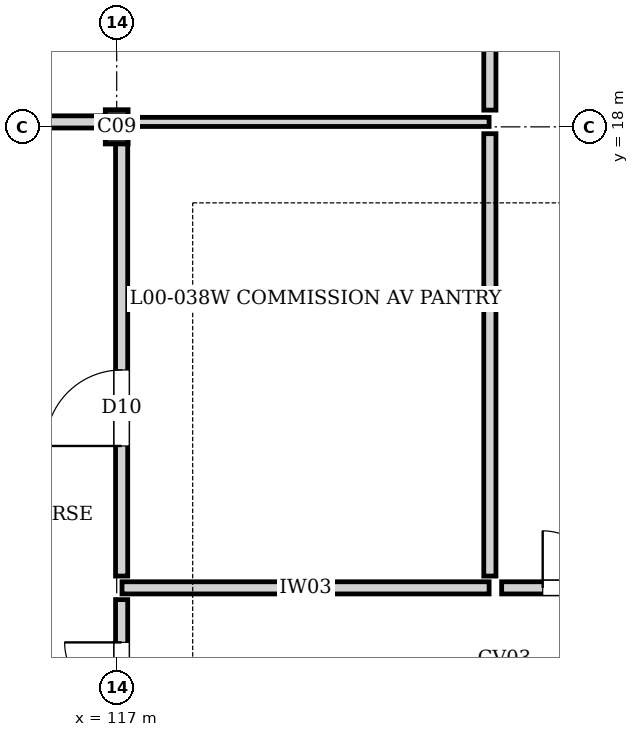
"""IFC4 building model, lengths in metres.
Left out: names, types, materials, properties, quantities, classifications, styles, units other than length and angle.
Written with IfcOpenShell. Run it as: python <this file> out.ifc"""

import sys

from ifc_helpers import new_model, si_unit, direction, frame, frame_2d, origin, origin_2d, place, context, subcontext, project, spatial, rectangle, i_section, extrude, element, fill, save


model = new_model("IFC4")
c1 = context("Model", 3, precision=1e-05, world=origin(), true_north=direction((0.0, 1.0)))
c2 = subcontext(c1, "Body", "Model", "MODEL_VIEW")
j1 = project(units=[si_unit("LENGTHUNIT", "METRE"), si_unit("PLANEANGLEUNIT", "RADIAN")], contexts=[c1])
p1 = place(None, origin())
s1 = spatial("IfcSite", under=j1, at=p1, CompositionType="ELEMENT")
p2 = place(p1, origin())
s2 = spatial("IfcBuilding", under=s1, at=p2, CompositionType="ELEMENT")
p3 = place(p2, origin())
s3 = spatial("IfcBuildingStorey", under=s2, at=p3, CompositionType="ELEMENT", Elevation=0.0)
p4 = place(p3, frame((117.0, 18.0, 0.0), z_axis=(0.0, 0.0, 1.0), x_axis=(1.0, 0.0, 0.0)))
e1 = element("IfcColumn", 1, at=p4, inside=s3, PredefinedType="COLUMN", context=c2, shape_type="SweptSolid", body=[
    extrude(i_section(OverallWidth=0.3, OverallDepth=0.45, WebThickness=0.014, FlangeThickness=0.026, at=origin_2d()), origin(), (0.0, 0.0, 1.0), 4.32),
])
p5 = place(p3, frame((108.145, 18.065, 0.0), z_axis=(0.0, 0.0, 1.0), x_axis=(1.0, 0.0, 0.0)))
e2 = element("IfcWall", 2, at=p5, inside=s3, PredefinedType="PARTITIONING", context=c2, shape_type="SweptSolid", body=[
    extrude(rectangle(XDim=8.915, YDim=0.16, at=frame_2d((4.458, 0.0))), origin(), (0.0, 0.0, 1.0), 3.695),
])
p6 = place(p3, frame((117.07, 11.935, 0.0), z_axis=(0.0, 0.0, 1.0), x_axis=(1.0, 0.0, 0.0)))
e3 = element("IfcWall", 3, at=p6, inside=s3, PredefinedType="PARTITIONING", context=c2, shape_type="SweptSolid", body=[
    extrude(rectangle(XDim=4.83, YDim=0.16, at=frame_2d((2.415, 0.0))), origin(), (0.0, 0.0, 1.0), 4.055),
])
p7 = place(p3, frame((117.07, 18.065, 0.0), z_axis=(0.0, 0.0, 1.0), x_axis=(1.0, 0.0, 0.0)))
e4 = element("IfcWall", 4, at=p7, inside=s3, PredefinedType="PARTITIONING", context=c2, shape_type="SweptSolid", body=[
    extrude(rectangle(XDim=4.83, YDim=0.12, at=frame_2d((2.415, 0.0))), origin(), (0.0, 0.0, 1.0), 3.655),
])
p8 = place(p3, frame((121.91, 12.09, 0.0), z_axis=(0.0, 0.0, 1.0), x_axis=(0.0, 1.0, 0.0)))
e5 = element("IfcWall", 5, at=p8, inside=s3, PredefinedType="PARTITIONING", context=c2, shape_type="SweptSolid", body=[
    extrude(rectangle(XDim=5.82, YDim=0.16, at=frame_2d((2.91, 0.0))), origin(), (0.0, 0.0, 1.0), 4.055),
])
p9 = place(p3, frame((117.065, 9.155, 0.0), z_axis=(0.0, 0.0, 1.0), x_axis=(0.0, 1.0, 0.0)))
e6 = element("IfcWall", 6, at=p9, inside=s3, PredefinedType="PARTITIONING", context=c2, shape_type="SweptSolid", body=[
    extrude(rectangle(XDim=2.625, YDim=0.16, at=frame_2d((1.312, 0.0))), origin(), (0.0, 0.0, 1.0), 3.665),
])
p10 = place(p9, frame((0.562, 0.0, 0.0)))
e7 = element("IfcOpeningElement", 7, at=p10, cuts=e6, PredefinedType="OPENING", context=c2, shape_type="SweptSolid", body=[
    extrude(rectangle(XDim=1.5, YDim=2.1, at=frame_2d((0.75, 1.05))), frame((0.0, 0.09, 0.0), z_axis=(0.0, -1.0, 0.0), x_axis=(1.0, 0.0, 0.0)), (0.0, 0.0, 1.0), 0.18),
])
p11 = place(p3, frame((117.065, 12.09, 0.0), z_axis=(0.0, 0.0, 1.0), x_axis=(0.0, 1.0, 0.0)))
e8 = element("IfcWall", 8, at=p11, inside=s3, PredefinedType="PARTITIONING", context=c2, shape_type="SweptSolid", body=[
    extrude(rectangle(XDim=5.82, YDim=0.16, at=frame_2d((2.91, 0.0))), origin(), (0.0, 0.0, 1.0), 3.665),
])
p12 = place(p11, frame((1.712, 0.0, 0.0)))
e9 = element("IfcOpeningElement", 9, at=p12, cuts=e8, PredefinedType="OPENING", context=c2, shape_type="SweptSolid", body=[
    extrude(rectangle(XDim=1.0, YDim=2.1, at=frame_2d((0.5, 1.05))), frame((0.0, 0.09, 0.0), z_axis=(0.0, -1.0, 0.0), x_axis=(1.0, 0.0, 0.0)), (0.0, 0.0, 1.0), 0.18),
])
p13 = place(p3, frame((122.065, 11.935, 0.0), z_axis=(0.0, 0.0, 1.0), x_axis=(1.0, 0.0, 0.0)))
e10 = element("IfcWall", 10, at=p13, inside=s3, PredefinedType="PARTITIONING", context=c2, shape_type="SweptSolid", body=[
    extrude(rectangle(XDim=3.69, YDim=0.16, at=frame_2d((1.845, 0.0))), origin(), (0.0, 0.0, 1.0), 4.055),
])
p14 = place(p13, frame((0.54, 0.0, 0.0)))
e11 = element("IfcOpeningElement", 11, at=p14, cuts=e10, PredefinedType="OPENING", context=c2, shape_type="SweptSolid", body=[
    extrude(rectangle(XDim=1.5, YDim=2.1, at=frame_2d((0.75, 1.05))), frame((0.0, 0.09, 0.0), z_axis=(0.0, -1.0, 0.0), x_axis=(1.0, 0.0, 0.0)), (0.0, 0.0, 1.0), 0.18),
])
p15 = place(p3, frame((121.91, 18.22, 0.0), z_axis=(0.0, 0.0, 1.0), x_axis=(0.0, 1.0, 0.0)))
e12 = element("IfcWall", 12, at=p15, inside=s3, PredefinedType="PARTITIONING", context=c2, shape_type="SweptSolid", body=[
    extrude(rectangle(XDim=8.535, YDim=0.16, at=frame_2d((4.268, 0.0))), origin(), (0.0, 0.0, 1.0), 4.055),
])
p16 = place(p15, frame((3.468, 0.0, 0.0)))
e13 = element("IfcOpeningElement", 13, at=p16, cuts=e12, PredefinedType="OPENING", context=c2, shape_type="SweptSolid", body=[
    extrude(rectangle(XDim=1.6, YDim=2.3, at=frame_2d((0.8, 1.15))), frame((0.0, 0.09, 0.0), z_axis=(0.0, -1.0, 0.0), x_axis=(1.0, 0.0, 0.0)), (0.0, 0.0, 1.0), 0.18),
])
p17 = place(p10, origin())
e14 = element("IfcDoor", 14, at=p17, inside=s3, OperationType="DOUBLE_DOOR_SINGLE_SWING", PredefinedType="DOOR", context=c2, shape_type="SweptSolid", body=[
    extrude(rectangle(XDim=1.5, YDim=2.1, at=frame_2d((0.75, 1.05))), frame((0.0, 0.025, 0.0), z_axis=(0.0, -1.0, 0.0), x_axis=(1.0, 0.0, 0.0)), (0.0, 0.0, 1.0), 0.05),
])
fill(e7, e14)
p18 = place(p12, origin())
e15 = element("IfcDoor", 15, at=p18, inside=s3, OperationType="SINGLE_SWING_LEFT", PredefinedType="DOOR", context=c2, shape_type="SweptSolid", body=[
    extrude(rectangle(XDim=1.0, YDim=2.1, at=frame_2d((0.5, 1.05))), frame((0.0, 0.025, 0.0), z_axis=(0.0, -1.0, 0.0), x_axis=(1.0, 0.0, 0.0)), (0.0, 0.0, 1.0), 0.05),
])
fill(e9, e15)
p19 = place(p14, origin())
e16 = element("IfcDoor", 16, at=p19, inside=s3, OperationType="DOUBLE_DOOR_SINGLE_SWING", PredefinedType="DOOR", context=c2, shape_type="SweptSolid", body=[
    extrude(rectangle(XDim=1.5, YDim=2.1, at=frame_2d((0.75, 1.05))), frame((0.0, 0.025, 0.0), z_axis=(0.0, -1.0, 0.0), x_axis=(1.0, 0.0, 0.0)), (0.0, 0.0, 1.0), 0.05),
])
fill(e11, e16)
save(model, sys.argv[1])
